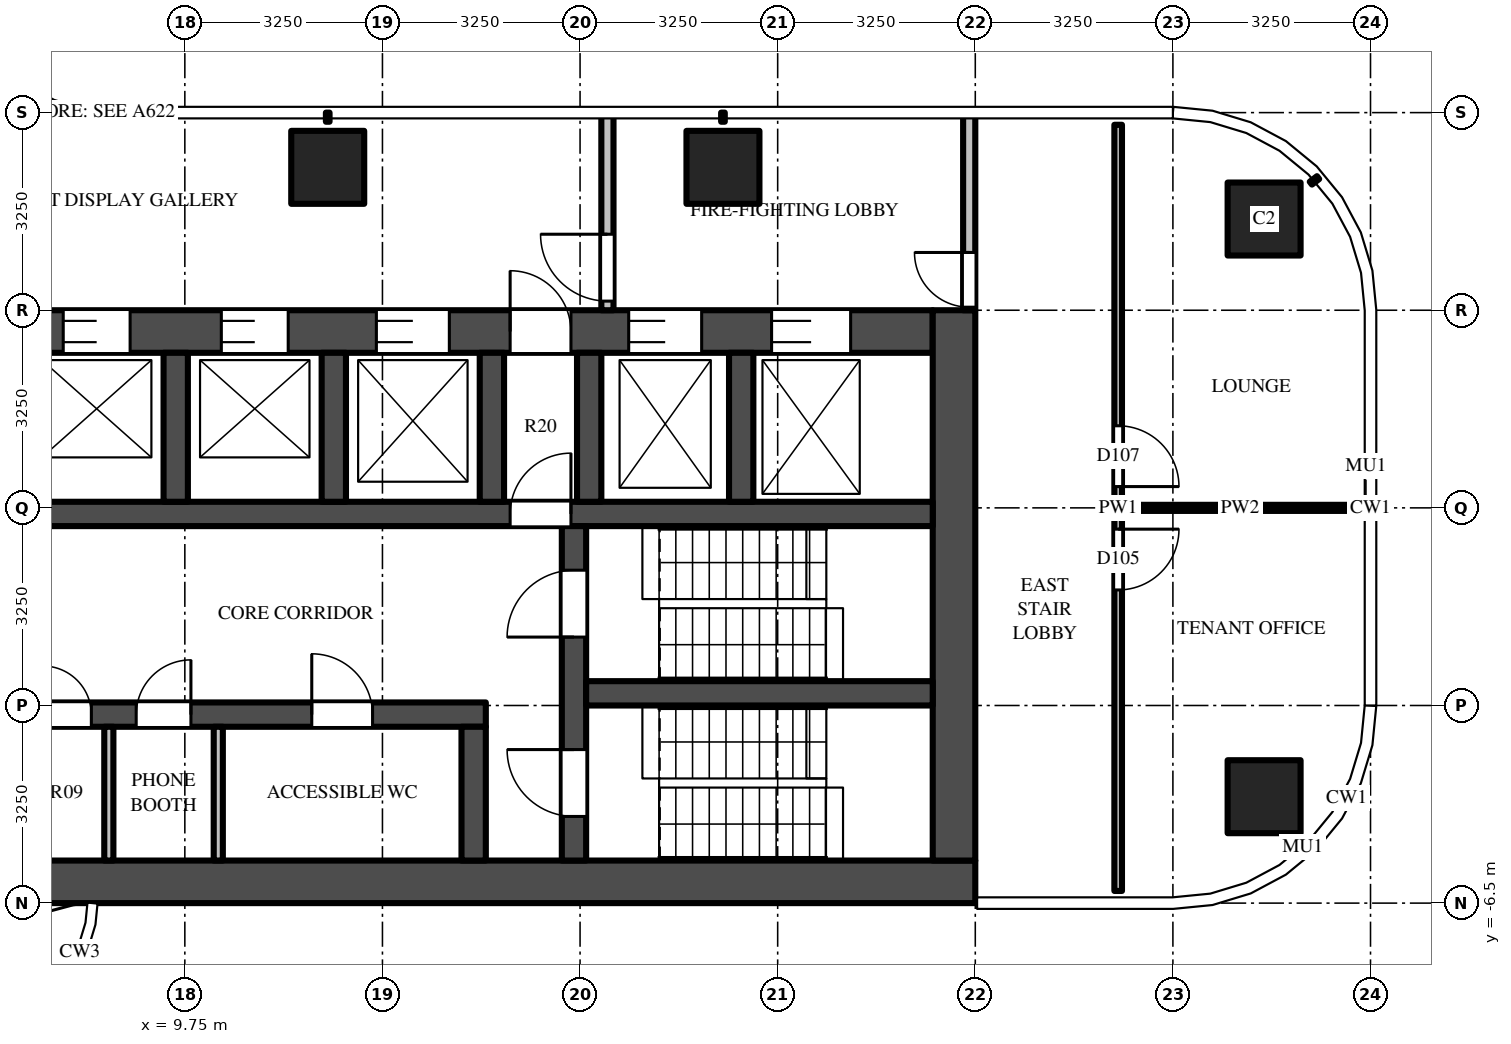
"""IFC4 building model, lengths in metres.
Left out: names, types, materials, properties, quantities, classifications, styles, units other than length and angle.
Written with IfcOpenShell. Run it as: python <this file> out.ifc"""

import sys

from ifc_helpers import new_model, si_unit, direction, frame, frame_2d, origin, origin_2d, place, context, subcontext, project, spatial, rectangle, extrude, source, transform, mapped, element, fill, save


model = new_model("IFC4")
c1 = context("Model", 3, precision=1e-05, world=origin(), true_north=direction((0.0, 1.0)))
c2 = subcontext(c1, "Body", "Model", "MODEL_VIEW")
j1 = project(units=[si_unit("LENGTHUNIT", "METRE"), si_unit("PLANEANGLEUNIT", "RADIAN")], contexts=[c1])
p1 = place(None, origin())
s1 = spatial("IfcSite", under=j1, at=p1, CompositionType="ELEMENT")
p2 = place(p1, origin())
s2 = spatial("IfcBuilding", under=s1, at=p2, CompositionType="ELEMENT")
p3 = place(p2, frame((0.0, 0.0, 189.3)))
s3 = spatial("IfcBuildingStorey", under=s2, at=p3, CompositionType="ELEMENT", Elevation=189.3)
m1 = source(origin(), c2, "Body", "SweptSolid", [
    extrude(rectangle(XDim=1.2, YDim=1.2, at=origin_2d()), origin(), (0.0, 0.0, 1.0), 3.9),
])
for number, where, z_axis, x_axis in (
    (1, (12.1, 5.6, 0.0), (0.0, 0.0, 1.0), (1.0, 0.0, 0.0)),
    (2, (18.6, 5.6, 0.0), (0.0, 0.0, 1.0), (1.0, 0.0, 0.0)),
    (3, (27.5, 4.75, 0.0), (0.0, 0.0, 1.0), (1.0, 0.0, 0.0)),
    (4, (27.5, -4.75, 0.0), (0.0, 0.0, 1.0), (1.0, 0.0, 0.0)),
):
    element("IfcColumn", number, at=place(p3, frame(where, z_axis=z_axis, x_axis=x_axis)), inside=s3, PredefinedType="COLUMN", context=c2, shape_type="MappedRepresentation", body=[
        mapped(m1, transform((0.0, 0.0, 0.0))),
    ])
m2 = source(origin(), c2, "Body", "SweptSolid", [
    extrude(rectangle(XDim=16.55, YDim=0.7, at=frame_2d((8.275, 0.0))), origin(), (0.0, 0.0, 1.0), 3.7),
])
p4 = place(p3, frame((6.2, -6.15, 0.0), z_axis=(0.0, 0.0, 1.0), x_axis=(1.0, 0.0, 0.0)))
e5 = element("IfcWall", 5, at=p4, inside=s3, PredefinedType="SHEAR", context=c2, shape_type="MappedRepresentation", body=[
    mapped(m2, transform((0.0, 0.0, 0.0))),
])
m3 = source(origin(), c2, "Body", "SweptSolid", [
    extrude(rectangle(XDim=14.85, YDim=0.7, at=frame_2d((7.425, 0.0))), origin(), (0.0, 0.0, 1.0), 3.7),
])
p5 = place(p3, frame((7.2, 2.9, 0.0), z_axis=(0.0, 0.0, 1.0), x_axis=(1.0, 0.0, 0.0)))
e6 = element("IfcWall", 6, at=p5, inside=s3, PredefinedType="SHEAR", context=c2, shape_type="MappedRepresentation", body=[
    mapped(m3, transform((0.0, 0.0, 0.0))),
])
m4 = source(origin(), c2, "Body", "SweptSolid", [
    extrude(rectangle(XDim=1.1, YDim=2.1, at=frame_2d((0.55, 1.05))), frame((0.0, 0.36, 0.0), z_axis=(0.0, -1.0, 0.0), x_axis=(1.0, 0.0, 0.0)), (0.0, 0.0, 1.0), 0.72),
])
p6 = place(p5, frame((0.55, 0.0, 0.0)))
e7 = element("IfcOpeningElement", 7, at=p6, cuts=e6, PredefinedType="OPENING", context=c2, shape_type="MappedRepresentation", body=[
    mapped(m4, transform((0.0, 0.0, 0.0))),
])
p7 = place(p5, frame((3.15, 0.0, 0.0)))
e8 = element("IfcOpeningElement", 8, at=p7, cuts=e6, PredefinedType="OPENING", context=c2, shape_type="MappedRepresentation", body=[
    mapped(m4, transform((0.0, 0.0, 0.0))),
])
m5 = source(origin(), c2, "Body", "SweptSolid", [
    extrude(rectangle(XDim=1.2, YDim=2.1, at=frame_2d((0.6, 1.05))), frame((0.0, 0.36, 0.0), z_axis=(0.0, -1.0, 0.0), x_axis=(1.0, 0.0, 0.0)), (0.0, 0.0, 1.0), 0.72),
])
p8 = place(p5, frame((5.7, 0.0, 0.0)))
e9 = element("IfcOpeningElement", 9, at=p8, cuts=e6, PredefinedType="OPENING", context=c2, shape_type="MappedRepresentation", body=[
    mapped(m5, transform((0.0, 0.0, 0.0))),
])
m6 = source(origin(), c2, "Body", "SweptSolid", [
    extrude(rectangle(XDim=1.3, YDim=2.1, at=frame_2d((0.65, 1.05))), frame((0.0, 0.36, 0.0), z_axis=(0.0, -1.0, 0.0), x_axis=(1.0, 0.0, 0.0)), (0.0, 0.0, 1.0), 0.72),
])
p9 = place(p5, frame((12.2, 0.0, 0.0)))
e10 = element("IfcOpeningElement", 10, at=p9, cuts=e6, PredefinedType="OPENING", context=c2, shape_type="MappedRepresentation", body=[
    mapped(m6, transform((0.0, 0.0, 0.0))),
])
p10 = place(p5, frame((9.85, 0.0, 0.0)))
e11 = element("IfcOpeningElement", 11, at=p10, cuts=e6, PredefinedType="OPENING", context=c2, shape_type="MappedRepresentation", body=[
    mapped(m5, transform((0.0, 0.0, 0.0))),
])
m7 = source(origin(), c2, "Body", "SweptSolid", [
    extrude(rectangle(XDim=1.0, YDim=2.1, at=frame_2d((0.5, 1.05))), frame((0.0, 0.36, 0.0), z_axis=(0.0, -1.0, 0.0), x_axis=(1.0, 0.0, 0.0)), (0.0, 0.0, 1.0), 0.72),
])
p11 = place(p5, frame((7.9, 0.0, 0.0)))
e12 = element("IfcOpeningElement", 12, at=p11, cuts=e6, PredefinedType="OPENING", context=c2, shape_type="MappedRepresentation", body=[
    mapped(m7, transform((0.0, 0.0, 0.0))),
])
m8 = source(origin(), c2, "Body", "SweptSolid", [
    extrude(rectangle(XDim=9.05, YDim=0.7, at=frame_2d((4.525, 0.0))), origin(), (0.0, 0.0, 1.0), 3.7),
])
p12 = place(p3, frame((22.4, -5.8, 0.0), z_axis=(0.0, 0.0, 1.0), x_axis=(0.0, 1.0, 0.0)))
e13 = element("IfcWall", 13, at=p12, inside=s3, PredefinedType="SHEAR", context=c2, shape_type="MappedRepresentation", body=[
    mapped(m8, transform((0.0, 0.0, 0.0))),
])
m9 = source(origin(), c2, "Body", "SweptSolid", [
    extrude(rectangle(XDim=7.5, YDim=0.4, at=frame_2d((3.75, 0.0))), origin(), (0.0, 0.0, 1.0), 3.7),
])
p13 = place(p3, frame((7.2, -3.4, 0.0), z_axis=(0.0, 0.0, 1.0), x_axis=(1.0, 0.0, 0.0)))
e14 = element("IfcWall", 14, at=p13, inside=s3, PredefinedType="SHEAR", context=c2, shape_type="MappedRepresentation", body=[
    mapped(m9, transform((0.0, 0.0, 0.0))),
])
m10 = source(origin(), c2, "Body", "SweptSolid", [
    extrude(rectangle(XDim=0.8, YDim=2.1, at=frame_2d((0.4, 1.05))), frame((0.0, 0.21, 0.0), z_axis=(0.0, -1.0, 0.0), x_axis=(1.0, 0.0, 0.0)), (0.0, 0.0, 1.0), 0.42),
])
p14 = place(p13, frame((0.212, 0.0, 0.0)))
e15 = element("IfcOpeningElement", 15, at=p14, cuts=e14, PredefinedType="OPENING", context=c2, shape_type="MappedRepresentation", body=[
    mapped(m10, transform((0.0, 0.0, 0.0))),
])
m11 = source(origin(), c2, "Body", "SweptSolid", [
    extrude(rectangle(XDim=0.9, YDim=2.1, at=frame_2d((0.45, 1.05))), frame((0.0, 0.21, 0.0), z_axis=(0.0, -1.0, 0.0), x_axis=(1.0, 0.0, 0.0)), (0.0, 0.0, 1.0), 0.42),
])
p15 = place(p13, frame((1.75, 0.0, 0.0)))
e16 = element("IfcOpeningElement", 16, at=p15, cuts=e14, PredefinedType="OPENING", context=c2, shape_type="MappedRepresentation", body=[
    mapped(m11, transform((0.0, 0.0, 0.0))),
])
m12 = source(origin(), c2, "Body", "SweptSolid", [
    extrude(rectangle(XDim=1.0, YDim=2.1, at=frame_2d((0.5, 1.05))), frame((0.0, 0.21, 0.0), z_axis=(0.0, -1.0, 0.0), x_axis=(1.0, 0.0, 0.0)), (0.0, 0.0, 1.0), 0.42),
])
p16 = place(p13, frame((4.637, 0.0, 0.0)))
e17 = element("IfcOpeningElement", 17, at=p16, cuts=e14, PredefinedType="OPENING", context=c2, shape_type="MappedRepresentation", body=[
    mapped(m12, transform((0.0, 0.0, 0.0))),
])
m13 = source(origin(), c2, "Body", "SweptSolid", [
    extrude(rectangle(XDim=14.85, YDim=0.4, at=frame_2d((7.425, 0.0))), origin(), (0.0, 0.0, 1.0), 3.7),
])
p17 = place(p3, frame((7.2, -0.1, 0.0), z_axis=(0.0, 0.0, 1.0), x_axis=(1.0, 0.0, 0.0)))
e18 = element("IfcWall", 18, at=p17, inside=s3, PredefinedType="SHEAR", context=c2, shape_type="MappedRepresentation", body=[
    mapped(m13, transform((0.0, 0.0, 0.0))),
])
p18 = place(p17, frame((7.9, 0.0, 0.0)))
e19 = element("IfcOpeningElement", 19, at=p18, cuts=e18, PredefinedType="OPENING", context=c2, shape_type="MappedRepresentation", body=[
    mapped(m12, transform((0.0, 0.0, 0.0))),
])
m14 = source(origin(), c2, "Body", "SweptSolid", [
    extrude(rectangle(XDim=5.5, YDim=0.4, at=frame_2d((2.75, 0.0))), origin(), (0.0, 0.0, 1.0), 3.7),
])
p19 = place(p3, frame((16.15, -5.8, 0.0), z_axis=(0.0, 0.0, 1.0), x_axis=(0.0, 1.0, 0.0)))
e20 = element("IfcWall", 20, at=p19, inside=s3, PredefinedType="SHEAR", context=c2, shape_type="MappedRepresentation", body=[
    mapped(m14, transform((0.0, 0.0, 0.0))),
])
m15 = source(origin(), c2, "Body", "SweptSolid", [
    extrude(rectangle(XDim=1.1, YDim=2.1, at=frame_2d((0.55, 1.05))), frame((0.0, 0.21, 0.0), z_axis=(0.0, -1.0, 0.0), x_axis=(1.0, 0.0, 0.0)), (0.0, 0.0, 1.0), 0.42),
])
p20 = place(p19, frame((0.725, 0.0, 0.0)))
e21 = element("IfcOpeningElement", 21, at=p20, cuts=e20, PredefinedType="OPENING", context=c2, shape_type="MappedRepresentation", body=[
    mapped(m15, transform((0.0, 0.0, 0.0))),
])
p21 = place(p19, frame((3.675, 0.0, 0.0)))
e22 = element("IfcOpeningElement", 22, at=p21, cuts=e20, PredefinedType="OPENING", context=c2, shape_type="MappedRepresentation", body=[
    mapped(m15, transform((0.0, 0.0, 0.0))),
])
m16 = source(origin(), c2, "Body", "SweptSolid", [
    extrude(rectangle(XDim=5.7, YDim=0.4, at=frame_2d((2.85, 0.0))), origin(), (0.0, 0.0, 1.0), 3.7),
])
p22 = place(p3, frame((16.35, -3.05, 0.0), z_axis=(0.0, 0.0, 1.0), x_axis=(1.0, 0.0, 0.0)))
e23 = element("IfcWall", 23, at=p22, inside=s3, PredefinedType="SHEAR", context=c2, shape_type="MappedRepresentation", body=[
    mapped(m16, transform((0.0, 0.0, 0.0))),
])
m17 = source(origin(), c2, "Body", "SweptSolid", [
    extrude(rectangle(XDim=2.2, YDim=0.4, at=frame_2d((1.1, 0.0))), origin(), (0.0, 0.0, 1.0), 3.7),
])
p23 = place(p3, frame((14.5, -5.8, 0.0), z_axis=(0.0, 0.0, 1.0), x_axis=(0.0, 1.0, 0.0)))
e24 = element("IfcWall", 24, at=p23, inside=s3, PredefinedType="SHEAR", context=c2, shape_type="MappedRepresentation", body=[
    mapped(m17, transform((0.0, 0.0, 0.0))),
])
m18 = source(origin(), c2, "Body", "SweptSolid", [
    extrude(rectangle(XDim=2.45, YDim=0.4, at=frame_2d((1.225, 0.0))), origin(), (0.0, 0.0, 1.0), 3.7),
])
for number, where, z_axis, x_axis in (
    (25, (9.6, 0.1, 0.0), (0.0, 0.0, 1.0), (0.0, 1.0, 0.0)),
    (26, (12.2, 0.1, 0.0), (0.0, 0.0, 1.0), (0.0, 1.0, 0.0)),
    (27, (14.8, 0.1, 0.0), (0.0, 0.0, 1.0), (0.0, 1.0, 0.0)),
    (28, (16.4, 0.1, 0.0), (0.0, 0.0, 1.0), (0.0, 1.0, 0.0)),
    (29, (18.9, 0.1, 0.0), (0.0, 0.0, 1.0), (0.0, 1.0, 0.0)),
):
    element("IfcWall", number, at=place(p3, frame(where, z_axis=z_axis, x_axis=x_axis)), inside=s3, PredefinedType="SHEAR", context=c2, shape_type="MappedRepresentation", body=[
        mapped(m18, transform((0.0, 0.0, 0.0))),
    ])
m19 = source(origin(), c2, "Body", "SweptSolid", [
    extrude(rectangle(XDim=3.25, YDim=0.2, at=frame_2d((1.625, 0.0))), origin(), (0.0, 0.0, 1.0), 3.7),
])
p24 = place(p3, frame((16.7, 3.25, 0.0), z_axis=(0.0, 0.0, 1.0), x_axis=(0.0, 1.0, 0.0)))
e30 = element("IfcWall", 30, at=p24, inside=s3, PredefinedType="PARTITIONING", context=c2, shape_type="MappedRepresentation", body=[
    mapped(m19, transform((0.0, 0.0, 0.0))),
])
m20 = source(origin(), c2, "Body", "SweptSolid", [
    extrude(rectangle(XDim=1.1, YDim=2.1, at=frame_2d((0.55, 1.05))), frame((0.0, 0.11, 0.0), z_axis=(0.0, -1.0, 0.0), x_axis=(1.0, 0.0, 0.0)), (0.0, 0.0, 1.0), 0.22),
])
p25 = place(p24, frame((0.15, 0.0, 0.0)))
e31 = element("IfcOpeningElement", 31, at=p25, cuts=e30, PredefinedType="OPENING", context=c2, shape_type="MappedRepresentation", body=[
    mapped(m20, transform((0.0, 0.0, 0.0))),
])
p26 = place(p3, frame((22.65, 3.25, 0.0), z_axis=(0.0, 0.0, 1.0), x_axis=(0.0, 1.0, 0.0)))
e32 = element("IfcWall", 32, at=p26, inside=s3, PredefinedType="PARTITIONING", context=c2, shape_type="MappedRepresentation", body=[
    mapped(m19, transform((0.0, 0.0, 0.0))),
])
m21 = source(origin(), c2, "Body", "SweptSolid", [
    extrude(rectangle(XDim=0.9, YDim=2.1, at=frame_2d((0.45, 1.05))), frame((0.0, 0.11, 0.0), z_axis=(0.0, -1.0, 0.0), x_axis=(1.0, 0.0, 0.0)), (0.0, 0.0, 1.0), 0.22),
])
p27 = place(p26, frame((0.05, 0.0, 0.0)))
e33 = element("IfcOpeningElement", 33, at=p27, cuts=e32, PredefinedType="OPENING", context=c2, shape_type="MappedRepresentation", body=[
    mapped(m21, transform((0.0, 0.0, 0.0))),
])
m22 = source(origin(), c2, "Body", "SweptSolid", [
    extrude(rectangle(XDim=2.2, YDim=0.15, at=frame_2d((1.1, 0.0))), origin(), (0.0, 0.0, 1.0), 3.7),
])
for number, where, z_axis, x_axis in (
    (34, (8.5, -5.8, 0.0), (0.0, 0.0, 1.0), (0.0, 1.0, 0.0)),
    (35, (10.3, -5.8, 0.0), (0.0, 0.0, 1.0), (0.0, 1.0, 0.0)),
):
    element("IfcWall", number, at=place(p3, frame(where, z_axis=z_axis, x_axis=x_axis)), inside=s3, PredefinedType="PARTITIONING", context=c2, shape_type="MappedRepresentation", body=[
        mapped(m22, transform((0.0, 0.0, 0.0))),
    ])
m23 = source(origin(), c2, "Body", "SweptSolid", [
    extrude(rectangle(XDim=12.6, YDim=0.125, at=frame_2d((6.3, 0.0))), origin(), (0.0, 0.0, 1.0), 2.78),
])
p28 = place(p3, frame((25.1, 6.3, 0.0), z_axis=(0.0, 0.0, 1.0), x_axis=(0.0, -1.0, 0.0)))
e36 = element("IfcWall", 36, at=p28, inside=s3, PredefinedType="PARTITIONING", context=c2, shape_type="MappedRepresentation", body=[
    mapped(m23, transform((0.0, 0.0, 0.0))),
])
m24 = source(origin(), c2, "Body", "SweptSolid", [
    extrude(rectangle(XDim=1.0, YDim=2.1, at=frame_2d((0.5, 1.05))), frame((0.0, 0.073, 0.0), z_axis=(0.0, -1.0, 0.0), x_axis=(1.0, 0.0, 0.0)), (0.0, 0.0, 1.0), 0.145),
])
p29 = place(p28, frame((6.65, 0.0, 0.0)))
e37 = element("IfcOpeningElement", 37, at=p29, cuts=e36, PredefinedType="OPENING", context=c2, shape_type="MappedRepresentation", body=[
    mapped(m24, transform((0.0, 0.0, 0.0))),
])
p30 = place(p28, frame((4.95, 0.0, 0.0)))
e38 = element("IfcOpeningElement", 38, at=p30, cuts=e36, PredefinedType="OPENING", context=c2, shape_type="MappedRepresentation", body=[
    mapped(m24, transform((0.0, 0.0, 0.0))),
])
m25 = source(origin(), c2, "Body", "SweptSolid", [
    extrude(rectangle(XDim=3.887, YDim=0.1, at=frame_2d((1.944, 0.0))), origin(), (0.0, 0.0, 1.0), 2.78),
])
p31 = place(p3, frame((25.163, 0.0, 0.0), z_axis=(0.0, 0.0, 1.0), x_axis=(1.0, 0.0, 0.0)))
e39 = element("IfcWall", 39, at=p31, inside=s3, PredefinedType="PARTITIONING", context=c2, shape_type="MappedRepresentation", body=[
    mapped(m25, transform((0.0, 0.0, 0.0))),
])
m26 = source(origin(), c2, "Body", "SweptSolid", [
    extrude(rectangle(XDim=1.1, YDim=2.1, at=frame_2d((0.55, 1.05))), frame((0.0, -0.275, 0.0), z_axis=(0.0, -1.0, 0.0), x_axis=(1.0, 0.0, 0.0)), (0.0, 0.0, 1.0), 0.05),
])
p32 = place(p6, origin())
e40 = element("IfcDoor", 40, at=p32, inside=s3, OperationType="DOUBLE_DOOR_SLIDING", PredefinedType="DOOR", context=c2, shape_type="MappedRepresentation", body=[
    mapped(m26, transform((0.0, 0.0, 0.0))),
])
fill(e7, e40)
p33 = place(p7, origin())
e41 = element("IfcDoor", 41, at=p33, inside=s3, OperationType="DOUBLE_DOOR_SLIDING", PredefinedType="DOOR", context=c2, shape_type="MappedRepresentation", body=[
    mapped(m26, transform((0.0, 0.0, 0.0))),
])
fill(e8, e41)
m27 = source(origin(), c2, "Body", "SweptSolid", [
    extrude(rectangle(XDim=1.2, YDim=2.1, at=frame_2d((0.6, 1.05))), frame((0.0, -0.275, 0.0), z_axis=(0.0, -1.0, 0.0), x_axis=(1.0, 0.0, 0.0)), (0.0, 0.0, 1.0), 0.05),
])
p34 = place(p8, origin())
e42 = element("IfcDoor", 42, at=p34, inside=s3, OperationType="DOUBLE_DOOR_SLIDING", PredefinedType="DOOR", context=c2, shape_type="MappedRepresentation", body=[
    mapped(m27, transform((0.0, 0.0, 0.0))),
])
fill(e9, e42)
m28 = source(origin(), c2, "Body", "SweptSolid", [
    extrude(rectangle(XDim=1.3, YDim=2.1, at=frame_2d((0.65, 1.05))), frame((0.0, -0.275, 0.0), z_axis=(0.0, -1.0, 0.0), x_axis=(1.0, 0.0, 0.0)), (0.0, 0.0, 1.0), 0.05),
])
p35 = place(p9, origin())
e43 = element("IfcDoor", 43, at=p35, inside=s3, OperationType="DOUBLE_DOOR_SLIDING", PredefinedType="DOOR", context=c2, shape_type="MappedRepresentation", body=[
    mapped(m28, transform((0.0, 0.0, 0.0))),
])
fill(e10, e43)
p36 = place(p10, origin())
e44 = element("IfcDoor", 44, at=p36, inside=s3, OperationType="DOUBLE_DOOR_SLIDING", PredefinedType="DOOR", context=c2, shape_type="MappedRepresentation", body=[
    mapped(m27, transform((0.0, 0.0, 0.0))),
])
fill(e11, e44)
m29 = source(origin(), c2, "Body", "SweptSolid", [
    extrude(rectangle(XDim=1.1, YDim=2.1, at=frame_2d((0.55, 1.05))), frame((0.0, 0.025, 0.0), z_axis=(0.0, -1.0, 0.0), x_axis=(1.0, 0.0, 0.0)), (0.0, 0.0, 1.0), 0.05),
])
p37 = place(p20, origin())
e45 = element("IfcDoor", 45, at=p37, inside=s3, OperationType="SINGLE_SWING_RIGHT", PredefinedType="DOOR", context=c2, shape_type="MappedRepresentation", body=[
    mapped(m29, transform((0.0, 0.0, 0.0))),
])
fill(e21, e45)
p38 = place(p21, origin())
e46 = element("IfcDoor", 46, at=p38, inside=s3, OperationType="SINGLE_SWING_LEFT", PredefinedType="DOOR", context=c2, shape_type="MappedRepresentation", body=[
    mapped(m29, transform((0.0, 0.0, 0.0))),
])
fill(e22, e46)
m30 = source(origin(), c2, "Body", "SweptSolid", [
    extrude(rectangle(XDim=1.0, YDim=2.1, at=frame_2d((0.5, 1.05))), frame((0.0, 0.025, 0.0), z_axis=(0.0, -1.0, 0.0), x_axis=(1.0, 0.0, 0.0)), (0.0, 0.0, 1.0), 0.05),
])
p39 = place(p18, origin())
e47 = element("IfcDoor", 47, at=p39, inside=s3, OperationType="SINGLE_SWING_RIGHT", PredefinedType="DOOR", context=c2, shape_type="MappedRepresentation", body=[
    mapped(m30, transform((0.0, 0.0, 0.0))),
])
fill(e19, e47)
m31 = source(origin(), c2, "Body", "SweptSolid", [
    extrude(rectangle(XDim=1.0, YDim=2.1, at=frame_2d((0.5, 1.05))), frame((0.0, -0.275, 0.0), z_axis=(0.0, -1.0, 0.0), x_axis=(1.0, 0.0, 0.0)), (0.0, 0.0, 1.0), 0.05),
])
p40 = place(p11, origin())
e48 = element("IfcDoor", 48, at=p40, inside=s3, OperationType="SINGLE_SWING_LEFT", PredefinedType="DOOR", context=c2, shape_type="MappedRepresentation", body=[
    mapped(m31, transform((0.0, 0.0, 0.0))),
])
fill(e12, e48)
p41 = place(p25, origin())
e49 = element("IfcDoor", 49, at=p41, inside=s3, OperationType="SINGLE_SWING_RIGHT", PredefinedType="DOOR", context=c2, shape_type="MappedRepresentation", body=[
    mapped(m29, transform((0.0, 0.0, 0.0))),
])
fill(e31, e49)
m32 = source(origin(), c2, "Body", "SweptSolid", [
    extrude(rectangle(XDim=0.9, YDim=2.1, at=frame_2d((0.45, 1.05))), frame((0.0, 0.025, 0.0), z_axis=(0.0, -1.0, 0.0), x_axis=(1.0, 0.0, 0.0)), (0.0, 0.0, 1.0), 0.05),
])
p42 = place(p27, origin())
e50 = element("IfcDoor", 50, at=p42, inside=s3, OperationType="SINGLE_SWING_RIGHT", PredefinedType="DOOR", context=c2, shape_type="MappedRepresentation", body=[
    mapped(m32, transform((0.0, 0.0, 0.0))),
])
fill(e33, e50)
m33 = source(origin(), c2, "Body", "SweptSolid", [
    extrude(rectangle(XDim=0.8, YDim=2.1, at=frame_2d((0.4, 1.05))), frame((0.0, 0.025, 0.0), z_axis=(0.0, -1.0, 0.0), x_axis=(1.0, 0.0, 0.0)), (0.0, 0.0, 1.0), 0.05),
])
p43 = place(p14, origin())
e51 = element("IfcDoor", 51, at=p43, inside=s3, OperationType="SINGLE_SWING_LEFT", PredefinedType="DOOR", context=c2, shape_type="MappedRepresentation", body=[
    mapped(m33, transform((0.0, 0.0, 0.0))),
])
fill(e15, e51)
p44 = place(p15, origin())
e52 = element("IfcDoor", 52, at=p44, inside=s3, OperationType="SINGLE_SWING_RIGHT", PredefinedType="DOOR", context=c2, shape_type="MappedRepresentation", body=[
    mapped(m32, transform((0.0, 0.0, 0.0))),
])
fill(e16, e52)
p45 = place(p16, origin())
e53 = element("IfcDoor", 53, at=p45, inside=s3, OperationType="SINGLE_SWING_LEFT", PredefinedType="DOOR", context=c2, shape_type="MappedRepresentation", body=[
    mapped(m30, transform((0.0, 0.0, 0.0))),
])
fill(e17, e53)
p46 = place(p29, origin())
e54 = element("IfcDoor", 54, at=p46, inside=s3, OperationType="SINGLE_SWING_LEFT", PredefinedType="DOOR", context=c2, shape_type="MappedRepresentation", body=[
    mapped(m30, transform((0.0, 0.0, 0.0))),
])
fill(e37, e54)
p47 = place(p30, origin())
e55 = element("IfcDoor", 55, at=p47, inside=s3, OperationType="SINGLE_SWING_RIGHT", PredefinedType="DOOR", context=c2, shape_type="MappedRepresentation", body=[
    mapped(m30, transform((0.0, 0.0, 0.0))),
])
fill(e38, e55)
save(model, sys.argv[1])
